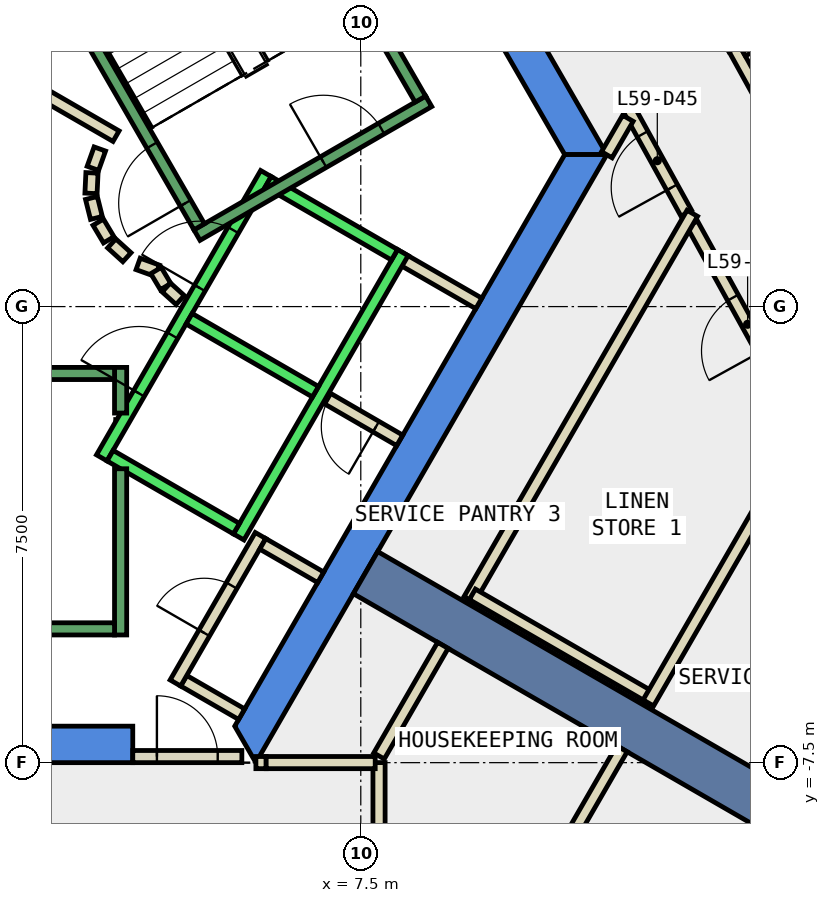
"""IFC4 building model, lengths in metres.
Left out: names, types, materials, properties, quantities, classifications, styles, units other than length and angle.
Written with IfcOpenShell. Run it as: python <this file> out.ifc"""

import sys

from ifc_helpers import new_model, si_unit, direction, frame, frame_2d, origin, place, context, subcontext, project, spatial, polyline, rectangle, outline, extrude, element, fill, save


model = new_model("IFC4")
c1 = context("Model", 3, precision=1e-05, world=origin(), true_north=direction((0.0, 1.0)))
c2 = subcontext(c1, "Body", "Model", "MODEL_VIEW")
j1 = project(units=[si_unit("LENGTHUNIT", "METRE"), si_unit("PLANEANGLEUNIT", "RADIAN")], contexts=[c1])
p1 = place(None, origin())
s1 = spatial("IfcSite", under=j1, at=p1, CompositionType="ELEMENT")
p2 = place(p1, origin())
s2 = spatial("IfcBuilding", under=s1, at=p2, CompositionType="ELEMENT")
p3 = place(p2, frame((0.0, 0.0, 259.4)))
s3 = spatial("IfcBuildingStorey", under=s2, at=p3, CompositionType="ELEMENT", Elevation=259.4)
p4 = place(p3, frame((0.0, 0.0, -0.34)))
e1 = element("IfcWall", 1, at=p4, inside=s3, PredefinedType="SHEAR", context=c2, shape_type="SweptSolid", body=[
    extrude(outline(polyline([(6.786, 10.747), (6.266, 10.447), (10.854, 2.5), (11.547, 2.5), (6.786, 10.747)])), origin(), (0.0, 0.0, 1.0), 3.6),
])
p5 = place(p3, frame((0.0, 0.0, -0.34)))
e2 = element("IfcWall", 2, at=p5, inside=s3, PredefinedType="SHEAR", context=c2, shape_type="SweptSolid", body=[
    extrude(outline(polyline([(3.75, -7.5), (3.75, -6.9), (-5.427, -6.9), (-5.774, -7.5), (3.75, -7.5)])), origin(), (0.0, 0.0, 1.0), 3.6),
])
p6 = place(p3, frame((0.0, 0.0, -0.34)))
e3 = element("IfcWall", 3, at=p6, inside=s3, PredefinedType="SHEAR", context=c2, shape_type="SweptSolid", body=[
    extrude(outline(polyline([(5.774, -7.5), (11.547, 2.5), (10.854, 2.5), (5.427, -6.9), (5.774, -7.5)])), origin(), (0.0, 0.0, 1.0), 3.6),
])
p7 = place(p3, frame((7.578, -4.375, -0.34), z_axis=(0.0, 0.0, 1.0), x_axis=(0.866024315419, -0.5000018851, 0.0)))
e4 = element("IfcWall", 4, at=p7, inside=s3, PredefinedType="SHEAR", context=c2, shape_type="SweptSolid", body=[
    extrude(rectangle(XDim=9.0, YDim=0.8, at=frame_2d((4.5, 0.0))), origin(), (0.0, 0.0, 1.0), 3.6),
])
p8 = place(p3, frame((12.854, 1.535, 0.0), z_axis=(0.0, 0.0, 1.0), x_axis=(-0.483730980407, 0.875216738068, 0.0)))
e5 = element("IfcWall", 5, at=p8, inside=s3, PredefinedType="PARTITIONING", context=c2, shape_type="SweptSolid", body=[
    extrude(rectangle(XDim=1.974, YDim=0.2, at=frame_2d((0.987, 0.0))), origin(), (0.0, 0.0, 1.0), 3.26),
])
p9 = place(p8, frame((0.487, 0.0, 0.0)))
e6 = element("IfcOpeningElement", 6, at=p9, cuts=e5, PredefinedType="OPENING", context=c2, shape_type="SweptSolid", body=[
    extrude(rectangle(XDim=1.0, YDim=2.1, at=frame_2d((0.5, 1.05))), frame((0.0, 0.11, 0.0), z_axis=(0.0, -1.0, 0.0), x_axis=(1.0, 0.0, 0.0)), (0.0, 0.0, 1.0), 0.22),
])
p10 = place(p3, frame((11.893, 3.097, 0.0), z_axis=(0.0, 0.0, 1.0), x_axis=(-0.500911294014, -0.865498628265, 0.0)))
e7 = element("IfcWall", 7, at=p10, inside=s3, PredefinedType="PARTITIONING", context=c2, shape_type="SweptSolid", body=[
    extrude(rectangle(XDim=0.693, YDim=0.2, at=frame_2d((0.347, 0.0))), origin(), (0.0, 0.0, 1.0), 3.26),
])
p11 = place(p3, frame((14.773, -1.941, 0.0), z_axis=(0.0, 0.0, 1.0), x_axis=(-0.483431586589, 0.875382145744, 0.0)))
e8 = element("IfcWall", 8, at=p11, inside=s3, PredefinedType="PARTITIONING", context=c2, shape_type="SweptSolid", body=[
    extrude(rectangle(XDim=3.771, YDim=0.2, at=frame_2d((1.885, 0.0))), origin(), (0.0, 0.0, 1.0), 3.26),
])
p12 = place(p11, frame((1.385, 0.0, 0.0)))
e9 = element("IfcOpeningElement", 9, at=p12, cuts=e8, PredefinedType="OPENING", context=c2, shape_type="SweptSolid", body=[
    extrude(rectangle(XDim=1.0, YDim=2.1, at=frame_2d((0.5, 1.05))), frame((0.0, 0.11, 0.0), z_axis=(0.0, -1.0, 0.0), x_axis=(1.0, 0.0, 0.0)), (0.0, 0.0, 1.0), 0.22),
])
p13 = place(p3, frame((13.641, 4.246, 0.0), z_axis=(0.0, 0.0, 1.0), x_axis=(0.483405752983, -0.875396411909, 0.0)))
e10 = element("IfcWall", 10, at=p13, inside=s3, PredefinedType="PARTITIONING", context=c2, shape_type="SweptSolid", body=[
    extrude(rectangle(XDim=4.284, YDim=0.2, at=frame_2d((2.142, 0.0))), origin(), (0.0, 0.0, 1.0), 3.26),
])
p14 = place(p13, frame((1.692, 0.0, 0.0)))
e11 = element("IfcOpeningElement", 11, at=p14, cuts=e10, PredefinedType="OPENING", context=c2, shape_type="SweptSolid", body=[
    extrude(rectangle(XDim=1.0, YDim=2.1, at=frame_2d((0.5, 1.05))), frame((0.0, 0.11, 0.0), z_axis=(0.0, -1.0, 0.0), x_axis=(1.0, 0.0, 0.0)), (0.0, 0.0, 1.0), 0.22),
])
p15 = place(p3, frame((5.541, -6.703, 0.0), z_axis=(0.0, 0.0, 1.0), x_axis=(-0.86621513555, 0.499671230855, 0.0)))
e12 = element("IfcWall", 12, at=p15, inside=s3, PredefinedType="PARTITIONING", context=c2, shape_type="SweptSolid", body=[
    extrude(rectangle(XDim=1.1, YDim=0.2, at=frame_2d((0.55, 0.0))), origin(), (0.0, 0.0, 1.0), 3.26),
])
p16 = place(p3, frame((4.451, -6.19, 0.0), z_axis=(0.0, 0.0, 1.0), x_axis=(0.500011755427, 0.866018616679, 0.0)))
e13 = element("IfcWall", 13, at=p16, inside=s3, PredefinedType="PARTITIONING", context=c2, shape_type="SweptSolid", body=[
    extrude(rectangle(XDim=2.8, YDim=0.2, at=frame_2d((1.4, 0.0))), origin(), (0.0, 0.0, 1.0), 3.26),
])
p17 = place(p16, frame((0.95, 0.0, 0.0)))
e14 = element("IfcOpeningElement", 14, at=p17, cuts=e13, PredefinedType="OPENING", context=c2, shape_type="SweptSolid", body=[
    extrude(rectangle(XDim=0.9, YDim=2.1, at=frame_2d((0.45, 1.05))), frame((0.0, 0.11, 0.0), z_axis=(0.0, -1.0, 0.0), x_axis=(1.0, 0.0, 0.0)), (0.0, 0.0, 1.0), 0.22),
])
p18 = place(p3, frame((5.888, -3.902, 0.0), z_axis=(0.0, 0.0, 1.0), x_axis=(0.86621513555, -0.499671230855, 0.0)))
e15 = element("IfcWall", 15, at=p18, inside=s3, PredefinedType="PARTITIONING", context=c2, shape_type="SweptSolid", body=[
    extrude(rectangle(XDim=1.1, YDim=0.2, at=frame_2d((0.55, 0.0))), origin(), (0.0, 0.0, 1.0), 3.26),
])
p19 = place(p3, frame((8.14, -2.2, 0.0), z_axis=(0.0, 0.0, 1.0), x_axis=(-0.865545166185, 0.500830874941, 0.0)))
e16 = element("IfcWall", 16, at=p19, inside=s3, PredefinedType="PARTITIONING", context=c2, shape_type="SweptSolid", body=[
    extrude(rectangle(XDim=1.5, YDim=0.2, at=frame_2d((0.75, 0.0))), origin(), (0.0, 0.0, 1.0), 3.26),
])
p20 = place(p19, frame((0.45, 0.0, 0.0)))
e17 = element("IfcOpeningElement", 17, at=p20, cuts=e16, PredefinedType="OPENING", context=c2, shape_type="SweptSolid", body=[
    extrude(rectangle(XDim=0.9, YDim=2.1, at=frame_2d((0.45, 1.05))), frame((0.0, 0.11, 0.0), z_axis=(0.0, -1.0, 0.0), x_axis=(1.0, 0.0, 0.0)), (0.0, 0.0, 1.0), 0.22),
])
p21 = place(p3, frame((8.141, 0.801, 0.0), z_axis=(0.0, 0.0, 1.0), x_axis=(0.866434738017, -0.499290341141, 0.0)))
e18 = element("IfcWall", 18, at=p21, inside=s3, PredefinedType="PARTITIONING", context=c2, shape_type="SweptSolid", body=[
    extrude(rectangle(XDim=1.5, YDim=0.2, at=frame_2d((0.75, 0.0))), origin(), (0.0, 0.0, 1.0), 3.26),
])
p22 = place(p3, frame((5.775, -7.499, 0.0), z_axis=(0.0, 0.0, 1.0), x_axis=(1.0, 0.0, 0.0)))
e19 = element("IfcWall", 19, at=p22, inside=s3, PredefinedType="PARTITIONING", context=c2, shape_type="SweptSolid", body=[
    extrude(rectangle(XDim=0.169, YDim=0.2, at=frame_2d((0.084, 0.0))), origin(), (0.0, 0.0, 1.0), 2.4),
])
p23 = place(p3, frame((7.8, -7.39, 0.0), z_axis=(0.0, 0.0, 1.0), x_axis=(0.499977374825, 0.866038466041, 0.0)))
e20 = element("IfcWall", 20, at=p23, inside=s3, PredefinedType="PARTITIONING", context=c2, shape_type="SweptSolid", body=[
    extrude(rectangle(XDim=2.1, YDim=0.2, at=frame_2d((1.05, 0.0))), origin(), (0.0, 0.0, 1.0), 3.26),
])
p24 = place(p3, frame((9.285, -4.818, 0.0), z_axis=(0.0, 0.0, 1.0), x_axis=(0.499962569651, 0.866047013128, 0.0)))
e21 = element("IfcWall", 21, at=p24, inside=s3, PredefinedType="PARTITIONING", context=c2, shape_type="SweptSolid", body=[
    extrude(rectangle(XDim=7.334, YDim=0.2, at=frame_2d((3.667, 0.0))), origin(), (0.0, 0.0, 1.0), 3.26),
])
p25 = place(p3, frame((1.866, 3.732, 0.0), z_axis=(0.0, 0.0, 1.0), x_axis=(0.866043361281, -0.499968895414, 0.0)))
e22 = element("IfcWall", 22, at=p25, inside=s3, PredefinedType="PARTITIONING", context=c2, shape_type="SweptSolid", body=[
    extrude(rectangle(XDim=1.858, YDim=0.2, at=frame_2d((0.929, 0.0))), origin(), (0.0, 0.0, 1.0), 3.26),
])
p26 = place(p3, frame((3.208, 2.592, 0.0), z_axis=(0.0, 0.0, 1.0), x_axis=(-0.337388820924, -0.941365382578, 0.0)))
e23 = element("IfcWall", 23, at=p26, inside=s3, PredefinedType="PARTITIONING", context=c2, shape_type="SweptSolid", body=[
    extrude(rectangle(XDim=0.338, YDim=0.2, at=frame_2d((0.169, 0.0))), origin(), (0.0, 0.0, 1.0), 3.26),
])
p27 = place(p3, frame((3.079, 2.199, 0.0), z_axis=(0.0, 0.0, 1.0), x_axis=(-0.047771483479, -0.998858290933, 0.0)))
e24 = element("IfcWall", 24, at=p27, inside=s3, PredefinedType="PARTITIONING", context=c2, shape_type="SweptSolid", body=[
    extrude(rectangle(XDim=0.337, YDim=0.2, at=frame_2d((0.169, 0.0))), origin(), (0.0, 0.0, 1.0), 3.26),
])
p28 = place(p3, frame((3.07, 1.786, 0.0), z_axis=(0.0, 0.0, 1.0), x_axis=(0.242705583207, -0.970099994784, 0.0)))
e25 = element("IfcWall", 25, at=p28, inside=s3, PredefinedType="PARTITIONING", context=c2, shape_type="SweptSolid", body=[
    extrude(rectangle(XDim=0.338, YDim=0.2, at=frame_2d((0.169, 0.0))), origin(), (0.0, 0.0, 1.0), 3.26),
])
for number, where, z_axis, x_axis in (
    (26, (3.182, 1.388, 0.0), (0.0, 0.0, 1.0), (0.512, -0.859, 0.0)),
    (27, (3.404, 1.039, 0.0), (0.0, 0.0, 1.0), (0.74, -0.672, 0.0)),
):
    element("IfcWall", number, at=place(p3, frame(where, z_axis=z_axis, x_axis=x_axis)), inside=s3, PredefinedType="PARTITIONING", context=c2, shape_type="SweptSolid", body=[
        extrude(rectangle(XDim=0.338, YDim=0.2, at=frame_2d((0.169, 0.0))), origin(), (0.0, 0.0, 1.0), 3.26),
    ])
p29 = place(p3, frame((3.838, 0.702, 0.0), z_axis=(0.0, 0.0, 1.0), x_axis=(0.941035081519, -0.338308993895, 0.0)))
e28 = element("IfcWall", 28, at=p29, inside=s3, PredefinedType="PARTITIONING", context=c2, shape_type="SweptSolid", body=[
    extrude(rectangle(XDim=0.337, YDim=0.2, at=frame_2d((0.168, 0.0))), origin(), (0.0, 0.0, 1.0), 3.26),
])
p30 = place(p3, frame((4.132, 0.593, 0.0), z_axis=(0.0, 0.0, 1.0), x_axis=(0.513561617048, -0.858052717201, 0.0)))
e29 = element("IfcWall", 29, at=p30, inside=s3, PredefinedType="PARTITIONING", context=c2, shape_type="SweptSolid", body=[
    extrude(rectangle(XDim=0.308, YDim=0.2, at=frame_2d((0.154, 0.0))), origin(), (0.0, 0.0, 1.0), 3.26),
])
p31 = place(p3, frame((4.301, 0.315, 0.0), z_axis=(0.0, 0.0, 1.0), x_axis=(0.741798017506, -0.670623367639, 0.0)))
e30 = element("IfcWall", 30, at=p31, inside=s3, PredefinedType="PARTITIONING", context=c2, shape_type="SweptSolid", body=[
    extrude(rectangle(XDim=0.309, YDim=0.2, at=frame_2d((0.154, 0.0))), origin(), (0.0, 0.0, 1.0), 3.26),
])
p32 = place(p3, frame((7.8, -7.499, 0.0), z_axis=(0.0, 0.0, 1.0), x_axis=(0.0, -1.0, 0.0)))
e31 = element("IfcWall", 31, at=p32, inside=s3, PredefinedType="PARTITIONING", context=c2, shape_type="SweptSolid", body=[
    extrude(rectangle(XDim=4.685, YDim=0.2, at=frame_2d((2.343, 0.0))), origin(), (0.0, 0.0, 1.0), 3.26),
])
p33 = place(p32, frame((1.842, 0.0, 0.0)))
e32 = element("IfcOpeningElement", 32, at=p33, cuts=e31, PredefinedType="OPENING", context=c2, shape_type="SweptSolid", body=[
    extrude(rectangle(XDim=1.0, YDim=2.1, at=frame_2d((0.5, 1.05))), frame((0.0, 0.11, 0.0), z_axis=(0.0, -1.0, 0.0), x_axis=(1.0, 0.0, 0.0)), (0.0, 0.0, 1.0), 0.22),
])
p34 = place(p3, frame((9.335, -4.732, 0.0), z_axis=(0.0, 0.0, 1.0), x_axis=(0.866002606077, -0.500039484709, 0.0)))
e33 = element("IfcWall", 33, at=p34, inside=s3, PredefinedType="PARTITIONING", context=c2, shape_type="SweptSolid", body=[
    extrude(rectangle(XDim=3.4, YDim=0.2, at=frame_2d((1.7, 0.0))), origin(), (0.0, 0.0, 1.0), 3.26),
])
p35 = place(p3, frame((11.794, -7.271, 0.0), z_axis=(0.0, 0.0, 1.0), x_axis=(-0.499918457185, -0.866072477433, 0.0)))
e34 = element("IfcWall", 34, at=p35, inside=s3, PredefinedType="PARTITIONING", context=c2, shape_type="SweptSolid", body=[
    extrude(rectangle(XDim=5.607, YDim=0.2, at=frame_2d((2.803, 0.0))), origin(), (0.0, 0.0, 1.0), 3.26),
])
p36 = place(p3, frame((14.871, -1.942, 0.0), z_axis=(0.0, 0.0, 1.0), x_axis=(-0.50000507839, -0.866022471755, 0.0)))
e35 = element("IfcWall", 35, at=p36, inside=s3, PredefinedType="PARTITIONING", context=c2, shape_type="SweptSolid", body=[
    extrude(rectangle(XDim=5.284, YDim=0.2, at=frame_2d((2.642, 0.0))), origin(), (0.0, 0.0, 1.0), 3.26),
])
p37 = place(p3, frame((13.776, 4.208, 0.0), z_axis=(0.0, 0.0, 1.0), x_axis=(0.870669592898, 0.491868336044, 0.0)))
e36 = element("IfcWall", 36, at=p37, inside=s3, PredefinedType="PARTITIONING", context=c2, shape_type="SweptSolid", body=[
    extrude(rectangle(XDim=2.3, YDim=0.2, at=frame_2d((1.15, 0.0))), origin(), (0.0, 0.0, 1.0), 3.26),
])
p38 = place(p3, frame((3.75, -7.4, 0.0), z_axis=(0.0, 0.0, 1.0), x_axis=(1.0, 0.0, 0.0)))
e37 = element("IfcWall", 37, at=p38, inside=s3, PredefinedType="PARTITIONING", context=c2, shape_type="SweptSolid", body=[
    extrude(rectangle(XDim=1.794, YDim=0.2, at=frame_2d((0.897, 0.0))), origin(), (0.0, 0.0, 1.0), 2.4),
])
p39 = place(p38, frame((0.397, 0.0, 0.0)))
e38 = element("IfcOpeningElement", 38, at=p39, cuts=e37, PredefinedType="OPENING", context=c2, shape_type="SweptSolid", body=[
    extrude(rectangle(XDim=1.0, YDim=2.1, at=frame_2d((0.5, 1.05))), frame((0.0, 0.11, 0.0), z_axis=(0.0, -1.0, 0.0), x_axis=(1.0, 0.0, 0.0)), (0.0, 0.0, 1.0), 0.22),
])
p40 = place(p3, frame((5.944, -7.499, 0.0), z_axis=(0.0, 0.0, 1.0), x_axis=(1.0, 0.0, 0.0)))
e39 = element("IfcWall", 39, at=p40, inside=s3, PredefinedType="PARTITIONING", context=c2, shape_type="SweptSolid", body=[
    extrude(rectangle(XDim=1.793, YDim=0.2, at=frame_2d((0.896, 0.0))), origin(), (0.0, 0.0, 1.0), 3.26),
])
p41 = place(p3, frame((3.24, -2.488, 0.0), z_axis=(0.0, 0.0, 1.0), x_axis=(0.500034260056, 0.866005622828, 0.0)))
e40 = element("IfcWall", 40, at=p41, inside=s3, PredefinedType="STANDARD", context=c2, shape_type="SweptSolid", body=[
    extrude(rectangle(XDim=5.399, YDim=0.2, at=frame_2d((2.7, 0.0))), origin(), (0.0, 0.0, 1.0), 3.26),
])
p42 = place(p41, frame((3.225, 0.0, 0.0)))
e41 = element("IfcOpeningElement", 41, at=p42, cuts=e40, PredefinedType="OPENING", context=c2, shape_type="SweptSolid", body=[
    extrude(rectangle(XDim=1.1, YDim=2.1, at=frame_2d((0.55, 1.05))), frame((0.0, 0.11, 0.0), z_axis=(0.0, -1.0, 0.0), x_axis=(1.0, 0.0, 0.0)), (0.0, 0.0, 1.0), 0.22),
])
p43 = place(p41, frame((1.225, 0.0, 0.0)))
e42 = element("IfcOpeningElement", 42, at=p43, cuts=e40, PredefinedType="OPENING", context=c2, shape_type="SweptSolid", body=[
    extrude(rectangle(XDim=1.1, YDim=2.1, at=frame_2d((0.55, 1.05))), frame((0.0, 0.11, 0.0), z_axis=(0.0, -1.0, 0.0), x_axis=(1.0, 0.0, 0.0)), (0.0, 0.0, 1.0), 0.22),
])
p44 = place(p3, frame((5.492, -3.788, 0.0), z_axis=(0.0, 0.0, 1.0), x_axis=(0.500034260056, 0.866005622828, 0.0)))
e43 = element("IfcWall", 43, at=p44, inside=s3, PredefinedType="STANDARD", context=c2, shape_type="SweptSolid", body=[
    extrude(rectangle(XDim=5.399, YDim=0.2, at=frame_2d((2.7, 0.0))), origin(), (0.0, 0.0, 1.0), 3.26),
])
p45 = place(p3, frame((3.377, -2.452, 0.0), z_axis=(0.0, 0.0, 1.0), x_axis=(0.865955154139, -0.50012165622, 0.0)))
e44 = element("IfcWall", 44, at=p45, inside=s3, PredefinedType="STANDARD", context=c2, shape_type="SweptSolid", body=[
    extrude(rectangle(XDim=2.4, YDim=0.2, at=frame_2d((1.2, 0.0))), origin(), (0.0, 0.0, 1.0), 3.26),
])
for number, where, z_axis, x_axis in (
    (45, (4.677, -0.2, 0.0), (0.0, 0.0, 1.0), (0.866, -0.5, 0.0)),
    (46, (5.977, 2.052, 0.0), (0.0, 0.0, 1.0), (0.866, -0.5, 0.0)),
):
    element("IfcWall", number, at=place(p3, frame(where, z_axis=z_axis, x_axis=x_axis)), inside=s3, PredefinedType="STANDARD", context=c2, shape_type="SweptSolid", body=[
        extrude(rectangle(XDim=2.399, YDim=0.2, at=frame_2d((1.2, 0.0))), origin(), (0.0, 0.0, 1.0), 3.26),
    ])
p46 = place(p3, frame((3.55, -2.667, 0.0), z_axis=(0.0, 0.0, 1.0), x_axis=(0.0, -1.0, 0.0)))
e47 = element("IfcWall", 47, at=p46, inside=s3, PredefinedType="STANDARD", context=c2, shape_type="SweptSolid", body=[
    extrude(rectangle(XDim=2.733, YDim=0.2, at=frame_2d((1.366, 0.0))), origin(), (0.0, 0.0, 1.0), 3.26),
])
p47 = place(p3, frame((3.55, -1.0, 0.0), z_axis=(0.0, 0.0, 1.0), x_axis=(0.0, -1.0, 0.0)))
e48 = element("IfcWall", 48, at=p47, inside=s3, PredefinedType="STANDARD", context=c2, shape_type="SweptSolid", body=[
    extrude(rectangle(XDim=0.751, YDim=0.2, at=frame_2d((0.375, 0.0))), origin(), (0.0, 0.0, 1.0), 3.26),
])
p48 = place(p3, frame((-3.45, -1.1, 0.0), z_axis=(0.0, 0.0, 1.0), x_axis=(1.0, 0.0, 0.0)))
e49 = element("IfcWall", 49, at=p48, inside=s3, PredefinedType="STANDARD", context=c2, shape_type="SweptSolid", body=[
    extrude(rectangle(XDim=6.9, YDim=0.2, at=frame_2d((3.45, 0.0))), origin(), (0.0, 0.0, 1.0), 3.26),
])
p49 = place(p48, frame((0.45, 0.0, 0.0)))
e50 = element("IfcOpeningElement", 50, at=p49, cuts=e49, PredefinedType="OPENING", context=c2, shape_type="SweptSolid", body=[
    extrude(rectangle(XDim=1.1, YDim=2.2, at=frame_2d((0.55, 1.1))), frame((0.0, 0.11, 0.0), z_axis=(0.0, -1.0, 0.0), x_axis=(1.0, 0.0, 0.0)), (0.0, 0.0, 1.0), 0.22),
])
p50 = place(p3, frame((-3.45, -5.3, 0.0), z_axis=(0.0, 0.0, 1.0), x_axis=(1.0, 0.0, 0.0)))
e51 = element("IfcWall", 51, at=p50, inside=s3, PredefinedType="STANDARD", context=c2, shape_type="SweptSolid", body=[
    extrude(rectangle(XDim=6.9, YDim=0.2, at=frame_2d((3.45, 0.0))), origin(), (0.0, 0.0, 1.0), 3.26),
])
p51 = place(p3, frame((4.806, 1.176, 0.0), z_axis=(0.0, 0.0, 1.0), x_axis=(0.866059941101, 0.499940174841, 0.0)))
e52 = element("IfcWall", 52, at=p51, inside=s3, PredefinedType="STANDARD", context=c2, shape_type="SweptSolid", body=[
    extrude(rectangle(XDim=4.4, YDim=0.2, at=frame_2d((2.2, 0.0))), origin(), (0.0, 0.0, 1.0), 3.26),
])
p52 = place(p51, frame((2.4, 0.0, 0.0)))
e53 = element("IfcOpeningElement", 53, at=p52, cuts=e52, PredefinedType="OPENING", context=c2, shape_type="SweptSolid", body=[
    extrude(rectangle(XDim=1.1, YDim=2.2, at=frame_2d((0.55, 1.1))), frame((0.0, 0.11, 0.0), z_axis=(0.0, -1.0, 0.0), x_axis=(1.0, 0.0, 0.0)), (0.0, 0.0, 1.0), 0.22),
])
p53 = place(p3, frame((4.843, 1.312, 0.0), z_axis=(0.0, 0.0, 1.0), x_axis=(-0.499963383562, 0.866046543262, 0.0)))
e54 = element("IfcWall", 54, at=p53, inside=s3, PredefinedType="STANDARD", context=c2, shape_type="SweptSolid", body=[
    extrude(rectangle(XDim=6.9, YDim=0.2, at=frame_2d((3.45, 0.0))), origin(), (0.0, 0.0, 1.0), 3.26),
])
p54 = place(p53, frame((0.45, 0.0, 0.0)))
e55 = element("IfcOpeningElement", 55, at=p54, cuts=e54, PredefinedType="OPENING", context=c2, shape_type="SweptSolid", body=[
    extrude(rectangle(XDim=1.1, YDim=2.2, at=frame_2d((0.55, 1.1))), frame((0.0, 0.11, 0.0), z_axis=(0.0, -1.0, 0.0), x_axis=(1.0, 0.0, 0.0)), (0.0, 0.0, 1.0), 0.22),
])
p55 = place(p3, frame((8.48, 3.412, 0.0), z_axis=(0.0, 0.0, 1.0), x_axis=(-0.499978703459, 0.866037698999, 0.0)))
e56 = element("IfcWall", 56, at=p55, inside=s3, PredefinedType="STANDARD", context=c2, shape_type="SweptSolid", body=[
    extrude(rectangle(XDim=6.9, YDim=0.2, at=frame_2d((3.45, 0.0))), origin(), (0.0, 0.0, 1.0), 3.26),
])
p56 = place(p12, origin())
e57 = element("IfcDoor", 57, at=p56, inside=s3, OperationType="SINGLE_SWING_LEFT", PredefinedType="DOOR", context=c2, shape_type="SweptSolid", body=[
    extrude(rectangle(XDim=1.0, YDim=2.1, at=frame_2d((0.5, 1.05))), frame((0.0, 0.025, 0.0), z_axis=(0.0, -1.0, 0.0), x_axis=(1.0, 0.0, 0.0)), (0.0, 0.0, 1.0), 0.05),
])
fill(e9, e57)
p57 = place(p9, origin())
e58 = element("IfcDoor", 58, at=p57, inside=s3, OperationType="SINGLE_SWING_LEFT", PredefinedType="DOOR", context=c2, shape_type="SweptSolid", body=[
    extrude(rectangle(XDim=1.0, YDim=2.1, at=frame_2d((0.5, 1.05))), frame((0.0, 0.025, 0.0), z_axis=(0.0, -1.0, 0.0), x_axis=(1.0, 0.0, 0.0)), (0.0, 0.0, 1.0), 0.05),
])
fill(e6, e58)
p58 = place(p17, origin())
e59 = element("IfcDoor", 59, at=p58, inside=s3, OperationType="SINGLE_SWING_LEFT", PredefinedType="DOOR", context=c2, shape_type="SweptSolid", body=[
    extrude(rectangle(XDim=0.9, YDim=2.1, at=frame_2d((0.45, 1.05))), frame((0.0, 0.025, 0.0), z_axis=(0.0, -1.0, 0.0), x_axis=(1.0, 0.0, 0.0)), (0.0, 0.0, 1.0), 0.05),
])
fill(e14, e59)
p59 = place(p20, origin())
e60 = element("IfcDoor", 60, at=p59, inside=s3, OperationType="SINGLE_SWING_LEFT", PredefinedType="DOOR", context=c2, shape_type="SweptSolid", body=[
    extrude(rectangle(XDim=0.9, YDim=2.1, at=frame_2d((0.45, 1.05))), frame((0.0, 0.025, 0.0), z_axis=(0.0, -1.0, 0.0), x_axis=(1.0, 0.0, 0.0)), (0.0, 0.0, 1.0), 0.05),
])
fill(e17, e60)
p60 = place(p39, origin())
e61 = element("IfcDoor", 61, at=p60, inside=s3, OperationType="SINGLE_SWING_LEFT", PredefinedType="DOOR", context=c2, shape_type="SweptSolid", body=[
    extrude(rectangle(XDim=1.0, YDim=2.1, at=frame_2d((0.5, 1.05))), frame((0.0, 0.025, 0.0), z_axis=(0.0, -1.0, 0.0), x_axis=(1.0, 0.0, 0.0)), (0.0, 0.0, 1.0), 0.05),
])
fill(e38, e61)
p61 = place(p42, origin())
e62 = element("IfcDoor", 62, at=p61, inside=s3, OperationType="SLIDING_TO_LEFT", PredefinedType="DOOR", context=c2, shape_type="SweptSolid", body=[
    extrude(rectangle(XDim=1.1, YDim=2.1, at=frame_2d((0.55, 1.05))), frame((0.0, 0.025, 0.0), z_axis=(0.0, -1.0, 0.0), x_axis=(1.0, 0.0, 0.0)), (0.0, 0.0, 1.0), 0.05),
])
fill(e41, e62)
p62 = place(p43, origin())
e63 = element("IfcDoor", 63, at=p62, inside=s3, OperationType="SLIDING_TO_LEFT", PredefinedType="DOOR", context=c2, shape_type="SweptSolid", body=[
    extrude(rectangle(XDim=1.1, YDim=2.1, at=frame_2d((0.55, 1.05))), frame((0.0, 0.025, 0.0), z_axis=(0.0, -1.0, 0.0), x_axis=(1.0, 0.0, 0.0)), (0.0, 0.0, 1.0), 0.05),
])
fill(e42, e63)
p63 = place(p54, origin())
e64 = element("IfcDoor", 64, at=p63, inside=s3, OperationType="SINGLE_SWING_LEFT", PredefinedType="DOOR", context=c2, shape_type="SweptSolid", body=[
    extrude(rectangle(XDim=1.1, YDim=2.2, at=frame_2d((0.55, 1.1))), frame((0.0, 0.025, 0.0), z_axis=(0.0, -1.0, 0.0), x_axis=(1.0, 0.0, 0.0)), (0.0, 0.0, 1.0), 0.05),
])
fill(e55, e64)
p64 = place(p52, origin())
e65 = element("IfcDoor", 65, at=p64, inside=s3, OperationType="SINGLE_SWING_LEFT", PredefinedType="DOOR", context=c2, shape_type="SweptSolid", body=[
    extrude(rectangle(XDim=1.1, YDim=2.2, at=frame_2d((0.55, 1.1))), frame((0.0, 0.025, 0.0), z_axis=(0.0, -1.0, 0.0), x_axis=(1.0, 0.0, 0.0)), (0.0, 0.0, 1.0), 0.05),
])
fill(e53, e65)
save(model, sys.argv[1])
